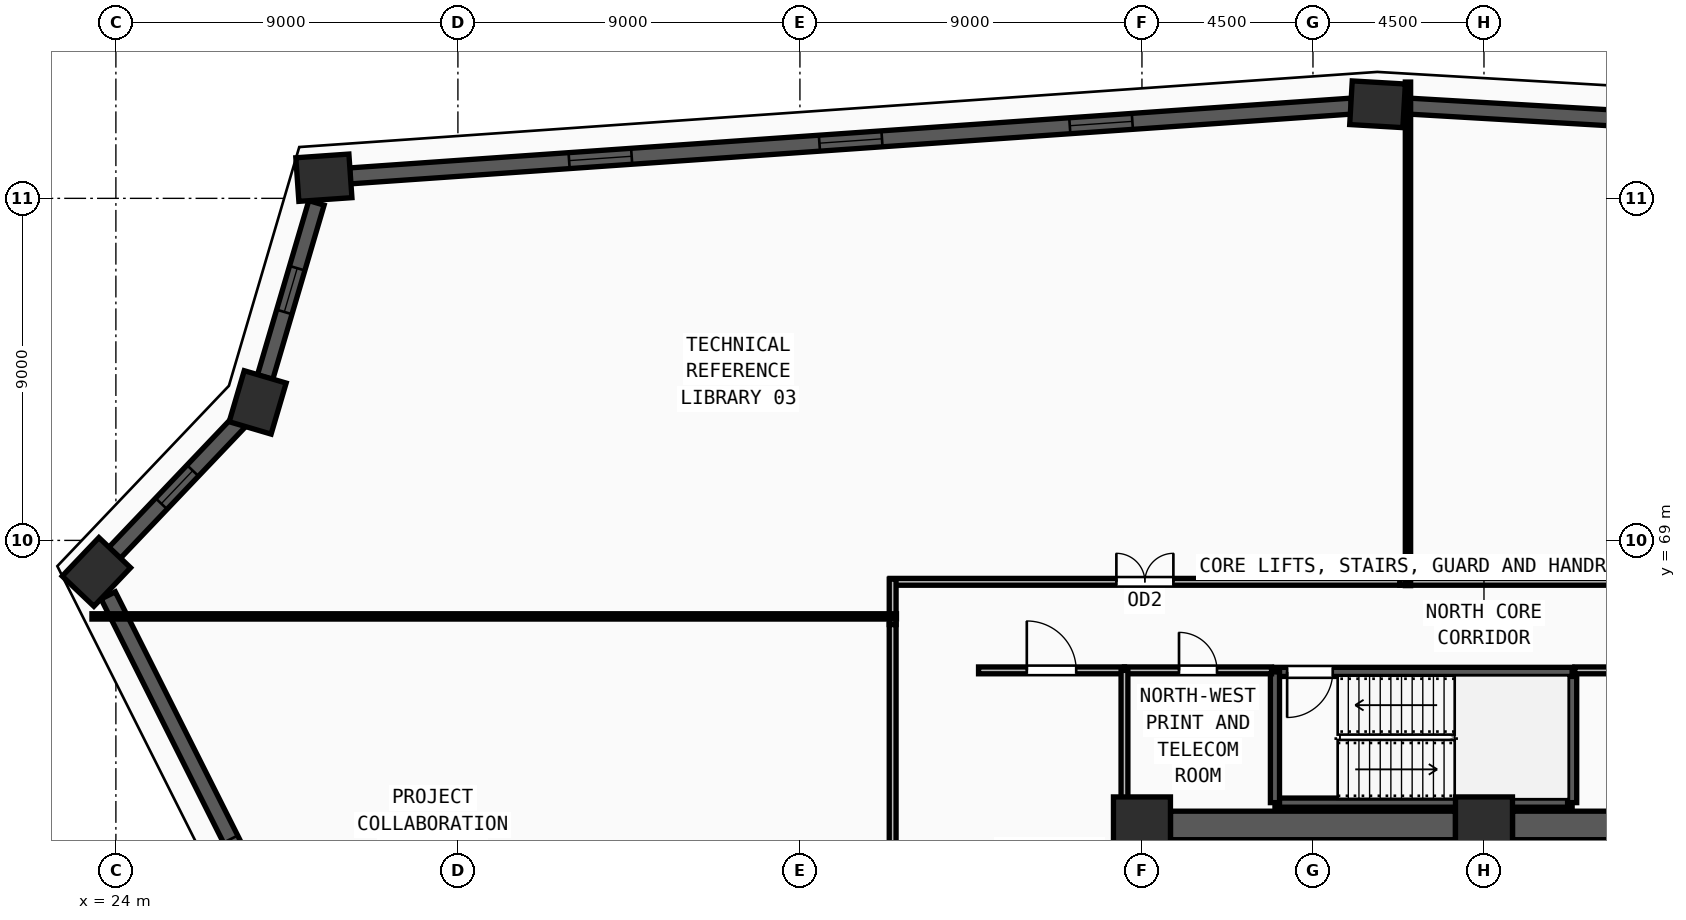
"""IFC4 building model, lengths in metres.
Left out: names, types, materials, properties, quantities, classifications, styles, units other than length and angle.
Written with IfcOpenShell. Run it as: python <this file> out.ifc"""

import sys

from ifc_helpers import new_model, si_unit, direction, frame, frame_2d, origin, origin_2d, place, context, subcontext, project, spatial, rectangle, extrude, source, transform, mapped, element, fill, save


model = new_model("IFC4")
c1 = context("Model", 3, precision=1e-05, world=origin(), true_north=direction((0.0, 1.0)))
c2 = subcontext(c1, "Body", "Model", "MODEL_VIEW")
j1 = project(units=[si_unit("LENGTHUNIT", "METRE"), si_unit("PLANEANGLEUNIT", "RADIAN")], contexts=[c1])
p1 = place(None, origin())
s1 = spatial("IfcSite", under=j1, at=p1, CompositionType="ELEMENT")
p2 = place(p1, origin())
s2 = spatial("IfcBuilding", under=s1, at=p2, CompositionType="ELEMENT")
p3 = place(p2, frame((0.0, 0.0, 113.25)))
s3 = spatial("IfcBuildingStorey", under=s2, at=p3, CompositionType="ELEMENT", Elevation=113.25)
m1 = source(origin(), c2, "Body", "SweptSolid", [
    extrude(rectangle(XDim=1.5, YDim=1.5, at=origin_2d()), origin(), (0.0, 0.0, 1.0), 3.75),
])
for number, where, z_axis, x_axis in (
    (1, (60.0, 61.5, 0.0), (0.0, 0.0, 1.0), (1.0, 0.0, 0.0)),
    (2, (51.0, 61.5, 0.0), (0.0, 0.0, 1.0), (1.0, 0.0, 0.0)),
):
    element("IfcColumn", number, at=place(p3, frame(where, z_axis=z_axis, x_axis=x_axis)), inside=s3, PredefinedType="COLUMN", context=c2, shape_type="MappedRepresentation", body=[
        mapped(m1, transform((0.0, 0.0, 0.0), x_axis=(1.0, 0.0, 0.0), y_axis=(0.0, 1.0, 0.0), z_axis=(0.0, 0.0, 1.0), scale=1.0)),
    ])
m2 = source(origin(), c2, "Body", "SweptSolid", [
    extrude(rectangle(XDim=1.4, YDim=1.15, at=origin_2d()), origin(), (0.0, 0.0, 1.0), 3.75),
])
for number, where, z_axis, x_axis in (
    (3, (23.487, 68.17, 0.0), (0.0, 0.0, 1.0), (0.689, 0.724, 0.0)),
    (4, (27.731, 72.631, 0.0), (0.0, 0.0, 1.0), (0.283, 0.959, 0.0)),
    (5, (29.473, 78.543, 0.0), (0.0, 0.0, 1.0), (0.998, 0.07, 0.0)),
    (6, (57.199, 80.475, 0.0), (0.0, 0.0, 1.0), (-0.998, 0.058, 0.0)),
):
    element("IfcColumn", number, at=place(p3, frame(where, z_axis=z_axis, x_axis=x_axis)), inside=s3, PredefinedType="COLUMN", context=c2, shape_type="MappedRepresentation", body=[
        mapped(m2, transform((0.0, 0.0, 0.0), x_axis=(1.0, 0.0, 0.0), y_axis=(0.0, 1.0, 0.0), z_axis=(0.0, 0.0, 1.0), scale=1.0)),
    ])
p4 = place(p3, frame((89.84, 78.576, 0.0), z_axis=(0.0, 0.0, 1.0), x_axis=(-0.99831154776, 0.05808660439, 0.0)))
e7 = element("IfcWall", 7, at=p4, inside=s3, PredefinedType="SOLIDWALL", context=c2, shape_type="SweptSolid", body=[
    extrude(rectangle(XDim=32.006, YDim=0.42, at=frame_2d((16.003, 0.0))), origin(), (0.0, 0.0, 1.0), 3.57),
])
m3 = source(origin(), c2, "Body", "SweptSolid", [
    extrude(rectangle(XDim=1.65, YDim=1.95, at=frame_2d((0.825, 0.975))), frame((0.0, 0.22, 0.0), z_axis=(0.0, -1.0, 0.0), x_axis=(1.0, 0.0, 0.0)), (0.0, 0.0, 1.0), 0.44),
])
p5 = place(p4, frame((7.177, 0.0, 0.55)))
e8 = element("IfcOpeningElement", 8, at=p5, cuts=e7, PredefinedType="OPENING", context=c2, shape_type="MappedRepresentation", body=[
    mapped(m3, transform((0.0, 0.0, 0.0), x_axis=(1.0, 0.0, 0.0), y_axis=(0.0, 1.0, 0.0), z_axis=(0.0, 0.0, 1.0), scale=1.0)),
])
p6 = place(p4, frame((15.178, 0.0, 0.55)))
e9 = element("IfcOpeningElement", 9, at=p6, cuts=e7, PredefinedType="OPENING", context=c2, shape_type="MappedRepresentation", body=[
    mapped(m3, transform((0.0, 0.0, 0.0), x_axis=(1.0, 0.0, 0.0), y_axis=(0.0, 1.0, 0.0), z_axis=(0.0, 0.0, 1.0), scale=1.0)),
])
p7 = place(p4, frame((23.18, 0.0, 0.55)))
e10 = element("IfcOpeningElement", 10, at=p7, cuts=e7, PredefinedType="OPENING", context=c2, shape_type="MappedRepresentation", body=[
    mapped(m3, transform((0.0, 0.0, 0.0), x_axis=(1.0, 0.0, 0.0), y_axis=(0.0, 1.0, 0.0), z_axis=(0.0, 0.0, 1.0), scale=1.0)),
])
p8 = place(p3, frame((56.511, 80.427, 0.0), z_axis=(0.0, 0.0, 1.0), x_axis=(-0.997581513864, -0.069506281704, 0.0)))
e11 = element("IfcWall", 11, at=p8, inside=s3, PredefinedType="SOLIDWALL", context=c2, shape_type="SweptSolid", body=[
    extrude(rectangle(XDim=26.414, YDim=0.42, at=frame_2d((13.207, 0.0))), origin(), (0.0, 0.0, 1.0), 3.57),
])
p9 = place(p8, frame((5.778, 0.0, 0.55)))
e12 = element("IfcOpeningElement", 12, at=p9, cuts=e11, PredefinedType="OPENING", context=c2, shape_type="MappedRepresentation", body=[
    mapped(m3, transform((0.0, 0.0, 0.0), x_axis=(1.0, 0.0, 0.0), y_axis=(0.0, 1.0, 0.0), z_axis=(0.0, 0.0, 1.0), scale=1.0)),
])
p10 = place(p8, frame((12.382, 0.0, 0.55)))
e13 = element("IfcOpeningElement", 13, at=p10, cuts=e11, PredefinedType="OPENING", context=c2, shape_type="MappedRepresentation", body=[
    mapped(m3, transform((0.0, 0.0, 0.0), x_axis=(1.0, 0.0, 0.0), y_axis=(0.0, 1.0, 0.0), z_axis=(0.0, 0.0, 1.0), scale=1.0)),
])
p11 = place(p8, frame((18.985, 0.0, 0.55)))
e14 = element("IfcOpeningElement", 14, at=p11, cuts=e11, PredefinedType="OPENING", context=c2, shape_type="MappedRepresentation", body=[
    mapped(m3, transform((0.0, 0.0, 0.0), x_axis=(1.0, 0.0, 0.0), y_axis=(0.0, 1.0, 0.0), z_axis=(0.0, 0.0, 1.0), scale=1.0)),
])
p12 = place(p3, frame((29.278, 77.881, 0.0), z_axis=(0.0, 0.0, 1.0), x_axis=(-0.282666457409, -0.959218261844, 0.0)))
e15 = element("IfcWall", 15, at=p12, inside=s3, PredefinedType="SOLIDWALL", context=c2, shape_type="SweptSolid", body=[
    extrude(rectangle(XDim=4.783, YDim=0.42, at=frame_2d((2.392, 0.0))), origin(), (0.0, 0.0, 1.0), 3.57),
])
m4 = source(origin(), c2, "Body", "SweptSolid", [
    extrude(rectangle(XDim=1.2, YDim=1.9, at=frame_2d((0.6, 0.95))), frame((0.0, 0.22, 0.0), z_axis=(0.0, -1.0, 0.0), x_axis=(1.0, 0.0, 0.0)), (0.0, 0.0, 1.0), 0.44),
])
p13 = place(p12, frame((1.792, 0.0, 0.55)))
e16 = element("IfcOpeningElement", 16, at=p13, cuts=e15, PredefinedType="OPENING", context=c2, shape_type="MappedRepresentation", body=[
    mapped(m4, transform((0.0, 0.0, 0.0), x_axis=(1.0, 0.0, 0.0), y_axis=(0.0, 1.0, 0.0), z_axis=(0.0, 0.0, 1.0), scale=1.0)),
])
p14 = place(p3, frame((27.255, 72.131, 0.0), z_axis=(0.0, 0.0, 1.0), x_axis=(-0.689175152742, -0.724594789412, 0.0)))
e17 = element("IfcWall", 17, at=p14, inside=s3, PredefinedType="SOLIDWALL", context=c2, shape_type="SweptSolid", body=[
    extrude(rectangle(XDim=4.777, YDim=0.42, at=frame_2d((2.388, 0.0))), origin(), (0.0, 0.0, 1.0), 3.57),
])
p15 = place(p14, frame((1.788, 0.0, 0.55)))
e18 = element("IfcOpeningElement", 18, at=p15, cuts=e17, PredefinedType="OPENING", context=c2, shape_type="MappedRepresentation", body=[
    mapped(m4, transform((0.0, 0.0, 0.0), x_axis=(1.0, 0.0, 0.0), y_axis=(0.0, 1.0, 0.0), z_axis=(0.0, 0.0, 1.0), scale=1.0)),
])
p16 = place(p3, frame((23.797, 67.553, 0.0), z_axis=(0.0, 0.0, 1.0), x_axis=(0.448851439989, -0.893606392558, 0.0)))
e19 = element("IfcWall", 19, at=p16, inside=s3, PredefinedType="SOLIDWALL", context=c2, shape_type="SweptSolid", body=[
    extrude(rectangle(XDim=32.004, YDim=0.42, at=frame_2d((16.002, 0.0))), origin(), (0.0, 0.0, 1.0), 3.57),
])
p17 = place(p16, frame((7.176, 0.0, 0.55)))
e20 = element("IfcOpeningElement", 20, at=p17, cuts=e19, PredefinedType="OPENING", context=c2, shape_type="MappedRepresentation", body=[
    mapped(m3, transform((0.0, 0.0, 0.0), x_axis=(1.0, 0.0, 0.0), y_axis=(0.0, 1.0, 0.0), z_axis=(0.0, 0.0, 1.0), scale=1.0)),
])
p18 = place(p16, frame((23.178, 0.0, 0.55)))
e21 = element("IfcOpeningElement", 21, at=p18, cuts=e19, PredefinedType="OPENING", context=c2, shape_type="MappedRepresentation", body=[
    mapped(m3, transform((0.0, 0.0, 0.0), x_axis=(1.0, 0.0, 0.0), y_axis=(0.0, 1.0, 0.0), z_axis=(0.0, 0.0, 1.0), scale=1.0)),
])
for number, where, z_axis, x_axis in (
    (22, (51.75, 61.5, 0.0), (0.0, 0.0, 1.0), (1.0, 0.0, 0.0)),
    (23, (60.75, 61.5, 0.0), (0.0, 0.0, 1.0), (1.0, 0.0, 0.0)),
):
    element("IfcWall", number, at=place(p3, frame(where, z_axis=z_axis, x_axis=x_axis)), inside=s3, PredefinedType="SHEAR", context=c2, shape_type="SweptSolid", body=[
        extrude(rectangle(XDim=7.5, YDim=0.75, at=frame_2d((3.75, 0.0))), origin(), (0.0, 0.0, 1.0), 3.57),
    ])
p19 = place(p3, frame((54.5, 62.1, 0.0), z_axis=(0.0, 0.0, 1.0), x_axis=(1.0, 0.0, 0.0)))
e24 = element("IfcWall", 24, at=p19, inside=s3, PredefinedType="SOLIDWALL", context=c2, shape_type="SweptSolid", body=[
    extrude(rectangle(XDim=7.82, YDim=0.24, at=frame_2d((3.91, 0.0))), origin(), (0.0, 0.0, 1.0), 3.57),
])
p20 = place(p3, frame((62.32, 62.1, 0.0), z_axis=(0.0, 0.0, 1.0), x_axis=(0.0, 1.0, 0.0)))
e25 = element("IfcWall", 25, at=p20, inside=s3, PredefinedType="SOLIDWALL", context=c2, shape_type="SweptSolid", body=[
    extrude(rectangle(XDim=3.44, YDim=0.24, at=frame_2d((1.72, 0.0))), origin(), (0.0, 0.0, 1.0), 3.57),
])
p21 = place(p3, frame((62.32, 65.54, 0.0), z_axis=(0.0, 0.0, 1.0), x_axis=(-1.0, 0.0, 0.0)))
e26 = element("IfcWall", 26, at=p21, inside=s3, PredefinedType="SOLIDWALL", context=c2, shape_type="SweptSolid", body=[
    extrude(rectangle(XDim=7.82, YDim=0.24, at=frame_2d((3.91, 0.0))), origin(), (0.0, 0.0, 1.0), 3.57),
])
m5 = source(origin(), c2, "Body", "SweptSolid", [
    extrude(rectangle(XDim=1.2, YDim=2.2, at=frame_2d((0.6, 1.1))), frame((0.0, 0.13, 0.0), z_axis=(0.0, -1.0, 0.0), x_axis=(1.0, 0.0, 0.0)), (0.0, 0.0, 1.0), 0.26),
])
p22 = place(p21, frame((6.3, 0.0, 0.0)))
e27 = element("IfcOpeningElement", 27, at=p22, cuts=e26, PredefinedType="OPENING", context=c2, shape_type="MappedRepresentation", body=[
    mapped(m5, transform((0.0, 0.0, 0.0), x_axis=(1.0, 0.0, 0.0), y_axis=(0.0, 1.0, 0.0), z_axis=(0.0, 0.0, 1.0), scale=1.0)),
])
p23 = place(p3, frame((54.5, 65.54, 0.0), z_axis=(0.0, 0.0, 1.0), x_axis=(0.0, -1.0, 0.0)))
e28 = element("IfcWall", 28, at=p23, inside=s3, PredefinedType="SOLIDWALL", context=c2, shape_type="SweptSolid", body=[
    extrude(rectangle(XDim=3.44, YDim=0.24, at=frame_2d((1.72, 0.0))), origin(), (0.0, 0.0, 1.0), 3.57),
])
p24 = place(p3, frame((50.54, 65.58, 0.0), z_axis=(0.0, 0.0, 1.0), x_axis=(1.0, 0.0, 0.0)))
e29 = element("IfcWall", 29, at=p24, inside=s3, PredefinedType="PARTITIONING", context=c2, shape_type="SweptSolid", body=[
    extrude(rectangle(XDim=3.87, YDim=0.18, at=frame_2d((1.935, 0.0))), origin(), (0.0, 0.0, 1.0), 3.57),
])
m6 = source(origin(), c2, "Body", "SweptSolid", [
    extrude(rectangle(XDim=1.0, YDim=2.2, at=frame_2d((0.5, 1.1))), frame((0.0, 0.1, 0.0), z_axis=(0.0, -1.0, 0.0), x_axis=(1.0, 0.0, 0.0)), (0.0, 0.0, 1.0), 0.2),
])
p25 = place(p24, frame((1.435, 0.0, 0.0)))
e30 = element("IfcOpeningElement", 30, at=p25, cuts=e29, PredefinedType="OPENING", context=c2, shape_type="MappedRepresentation", body=[
    mapped(m6, transform((0.0, 0.0, 0.0), x_axis=(1.0, 0.0, 0.0), y_axis=(0.0, 1.0, 0.0), z_axis=(0.0, 0.0, 1.0), scale=1.0)),
])
p26 = place(p3, frame((62.39, 65.58, 0.0), z_axis=(0.0, 0.0, 1.0), x_axis=(1.0, 0.0, 0.0)))
e31 = element("IfcWall", 31, at=p26, inside=s3, PredefinedType="PARTITIONING", context=c2, shape_type="SweptSolid", body=[
    extrude(rectangle(XDim=7.07, YDim=0.18, at=frame_2d((3.535, 0.0))), origin(), (0.0, 0.0, 1.0), 3.57),
])
p27 = place(p26, frame((3.035, 0.0, 0.0)))
e32 = element("IfcOpeningElement", 32, at=p27, cuts=e31, PredefinedType="OPENING", context=c2, shape_type="MappedRepresentation", body=[
    mapped(m6, transform((0.0, 0.0, 0.0), x_axis=(1.0, 0.0, 0.0), y_axis=(0.0, 1.0, 0.0), z_axis=(0.0, 0.0, 1.0), scale=1.0)),
])
p28 = place(p3, frame((46.7, 65.58, 0.0), z_axis=(0.0, 0.0, 1.0), x_axis=(1.0, 0.0, 0.0)))
e33 = element("IfcWall", 33, at=p28, inside=s3, PredefinedType="PARTITIONING", context=c2, shape_type="SweptSolid", body=[
    extrude(rectangle(XDim=3.84, YDim=0.18, at=frame_2d((1.92, 0.0))), origin(), (0.0, 0.0, 1.0), 3.57),
])
m7 = source(origin(), c2, "Body", "SweptSolid", [
    extrude(rectangle(XDim=1.3, YDim=2.2, at=frame_2d((0.65, 1.1))), frame((0.0, 0.1, 0.0), z_axis=(0.0, -1.0, 0.0), x_axis=(1.0, 0.0, 0.0)), (0.0, 0.0, 1.0), 0.2),
])
p29 = place(p28, frame((1.27, 0.0, 0.0)))
e34 = element("IfcOpeningElement", 34, at=p29, cuts=e33, PredefinedType="OPENING", context=c2, shape_type="MappedRepresentation", body=[
    mapped(m7, transform((0.0, 0.0, 0.0), x_axis=(1.0, 0.0, 0.0), y_axis=(0.0, 1.0, 0.0), z_axis=(0.0, 0.0, 1.0), scale=1.0)),
])
p30 = place(p3, frame((57.785, 67.91, 0.0), z_axis=(0.0, 0.0, 1.0), x_axis=(1.0, 0.0, 0.0)))
e35 = element("IfcWall", 35, at=p30, inside=s3, PredefinedType="PARTITIONING", context=c2, shape_type="SweptSolid", body=[
    extrude(rectangle(XDim=17.845, YDim=0.18, at=frame_2d((8.922, 0.0))), origin(), (0.0, 0.0, 1.0), 3.57),
])
m8 = source(origin(), c2, "Body", "SweptSolid", [
    extrude(rectangle(XDim=1.5, YDim=2.2, at=frame_2d((0.75, 1.1))), frame((0.0, 0.1, 0.0), z_axis=(0.0, -1.0, 0.0), x_axis=(1.0, 0.0, 0.0)), (0.0, 0.0, 1.0), 0.2),
])
p31 = place(p30, frame((8.172, 0.0, 0.0)))
e36 = element("IfcOpeningElement", 36, at=p31, cuts=e35, PredefinedType="OPENING", context=c2, shape_type="MappedRepresentation", body=[
    mapped(m8, transform((0.0, 0.0, 0.0), x_axis=(1.0, 0.0, 0.0), y_axis=(0.0, 1.0, 0.0), z_axis=(0.0, 0.0, 1.0), scale=1.0)),
])
p32 = place(p3, frame((44.37, 67.91, 0.0), z_axis=(0.0, 0.0, 1.0), x_axis=(1.0, 0.0, 0.0)))
e37 = element("IfcWall", 37, at=p32, inside=s3, PredefinedType="PARTITIONING", context=c2, shape_type="SweptSolid", body=[
    extrude(rectangle(XDim=13.415, YDim=0.18, at=frame_2d((6.708, 0.0))), origin(), (0.0, 0.0, 1.0), 3.57),
])
p33 = place(p32, frame((5.957, 0.0, 0.0)))
e38 = element("IfcOpeningElement", 38, at=p33, cuts=e37, PredefinedType="OPENING", context=c2, shape_type="MappedRepresentation", body=[
    mapped(m8, transform((0.0, 0.0, 0.0), x_axis=(1.0, 0.0, 0.0), y_axis=(0.0, 1.0, 0.0), z_axis=(0.0, 0.0, 1.0), scale=1.0)),
])
p34 = place(p3, frame((50.54, 61.95, 0.0), z_axis=(0.0, 0.0, 1.0), x_axis=(0.0, 1.0, 0.0)))
e39 = element("IfcWall", 39, at=p34, inside=s3, PredefinedType="PARTITIONING", context=c2, shape_type="SweptSolid", body=[
    extrude(rectangle(XDim=3.63, YDim=0.18, at=frame_2d((1.815, 0.0))), origin(), (0.0, 0.0, 1.0), 3.57),
])
p35 = place(p3, frame((44.44, 66.785, 0.0), z_axis=(0.0, 0.0, 1.0), x_axis=(0.0, 1.0, 0.0)))
e40 = element("IfcWall", 40, at=p35, inside=s3, PredefinedType="PARTITIONING", context=c2, shape_type="SweptSolid", body=[
    extrude(rectangle(XDim=1.195, YDim=0.18, at=frame_2d((0.598, 0.0))), origin(), (0.0, 0.0, 1.0), 3.57),
])
p36 = place(p3, frame((44.44, 56.19, 0.0), z_axis=(0.0, 0.0, 1.0), x_axis=(0.0, 1.0, 0.0)))
e41 = element("IfcWall", 41, at=p36, inside=s3, PredefinedType="PARTITIONING", context=c2, shape_type="SweptSolid", body=[
    extrude(rectangle(XDim=10.595, YDim=0.18, at=frame_2d((5.297, 0.0))), origin(), (0.0, 0.0, 1.0), 3.57),
])
p37 = place(p3, frame((44.54, 67.0, 0.0), z_axis=(0.0, 0.0, 1.0), x_axis=(-1.0, 0.0, 0.0)))
e42 = element("IfcWall", 42, at=p37, inside=s3, PredefinedType="PARTITIONING", context=c2, shape_type="SweptSolid", body=[
    extrude(rectangle(XDim=21.17, YDim=0.14, at=frame_2d((10.585, 0.0))), origin(), (0.0, 0.0, 1.0), 2.755),
])
p38 = place(p3, frame((58.0, 67.81, 0.0), z_axis=(0.0, 0.0, 1.0), x_axis=(0.0, 1.0, 0.0)))
e43 = element("IfcWall", 43, at=p38, inside=s3, PredefinedType="PARTITIONING", context=c2, shape_type="SweptSolid", body=[
    extrude(rectangle(XDim=13.25, YDim=0.14, at=frame_2d((6.625, 0.0))), origin(), (0.0, 0.0, 1.0), 3.57),
])
m9 = source(origin(), c2, "Body", "SweptSolid", [
    extrude(rectangle(XDim=1.65, YDim=1.95, at=frame_2d((0.825, 0.975))), frame((0.0, 0.03, 0.0), z_axis=(0.0, -1.0, 0.0), x_axis=(1.0, 0.0, 0.0)), (0.0, 0.0, 1.0), 0.06),
])
p39 = place(p9, origin())
e44 = element("IfcWindow", 44, at=p39, inside=s3, PartitioningType="DOUBLE_PANEL_VERTICAL", PredefinedType="WINDOW", context=c2, shape_type="MappedRepresentation", body=[
    mapped(m9, transform((0.0, 0.0, 0.0), x_axis=(1.0, 0.0, 0.0), y_axis=(0.0, 1.0, 0.0), z_axis=(0.0, 0.0, 1.0), scale=1.0)),
])
fill(e12, e44)
p40 = place(p10, origin())
e45 = element("IfcWindow", 45, at=p40, inside=s3, PartitioningType="DOUBLE_PANEL_VERTICAL", PredefinedType="WINDOW", context=c2, shape_type="MappedRepresentation", body=[
    mapped(m9, transform((0.0, 0.0, 0.0), x_axis=(1.0, 0.0, 0.0), y_axis=(0.0, 1.0, 0.0), z_axis=(0.0, 0.0, 1.0), scale=1.0)),
])
fill(e13, e45)
p41 = place(p11, origin())
e46 = element("IfcWindow", 46, at=p41, inside=s3, PartitioningType="DOUBLE_PANEL_VERTICAL", PredefinedType="WINDOW", context=c2, shape_type="MappedRepresentation", body=[
    mapped(m9, transform((0.0, 0.0, 0.0), x_axis=(1.0, 0.0, 0.0), y_axis=(0.0, 1.0, 0.0), z_axis=(0.0, 0.0, 1.0), scale=1.0)),
])
fill(e14, e46)
m10 = source(origin(), c2, "Body", "SweptSolid", [
    extrude(rectangle(XDim=1.2, YDim=1.9, at=frame_2d((0.6, 0.95))), frame((0.0, 0.03, 0.0), z_axis=(0.0, -1.0, 0.0), x_axis=(1.0, 0.0, 0.0)), (0.0, 0.0, 1.0), 0.06),
])
p42 = place(p13, origin())
e47 = element("IfcWindow", 47, at=p42, inside=s3, PartitioningType="SINGLE_PANEL", PredefinedType="WINDOW", context=c2, shape_type="MappedRepresentation", body=[
    mapped(m10, transform((0.0, 0.0, 0.0), x_axis=(1.0, 0.0, 0.0), y_axis=(0.0, 1.0, 0.0), z_axis=(0.0, 0.0, 1.0), scale=1.0)),
])
fill(e16, e47)
p43 = place(p15, origin())
e48 = element("IfcWindow", 48, at=p43, inside=s3, PartitioningType="SINGLE_PANEL", PredefinedType="WINDOW", context=c2, shape_type="MappedRepresentation", body=[
    mapped(m10, transform((0.0, 0.0, 0.0), x_axis=(1.0, 0.0, 0.0), y_axis=(0.0, 1.0, 0.0), z_axis=(0.0, 0.0, 1.0), scale=1.0)),
])
fill(e18, e48)
p44 = place(p17, origin())
e49 = element("IfcWindow", 49, at=p44, inside=s3, PartitioningType="DOUBLE_PANEL_VERTICAL", PredefinedType="WINDOW", context=c2, shape_type="MappedRepresentation", body=[
    mapped(m9, transform((0.0, 0.0, 0.0), x_axis=(1.0, 0.0, 0.0), y_axis=(0.0, 1.0, 0.0), z_axis=(0.0, 0.0, 1.0), scale=1.0)),
])
fill(e20, e49)
m11 = source(origin(), c2, "Body", "SweptSolid", [
    extrude(rectangle(XDim=1.2, YDim=2.2, at=frame_2d((0.6, 1.1))), frame((0.0, 0.025, 0.0), z_axis=(0.0, -1.0, 0.0), x_axis=(1.0, 0.0, 0.0)), (0.0, 0.0, 1.0), 0.05),
])
p45 = place(p22, origin())
e50 = element("IfcDoor", 50, at=p45, inside=s3, OperationType="SINGLE_SWING_RIGHT", PredefinedType="DOOR", context=c2, shape_type="MappedRepresentation", body=[
    mapped(m11, transform((0.0, 0.0, 0.0), x_axis=(1.0, 0.0, 0.0), y_axis=(0.0, 1.0, 0.0), z_axis=(0.0, 0.0, 1.0), scale=1.0)),
])
fill(e27, e50)
m12 = source(origin(), c2, "Body", "SweptSolid", [
    extrude(rectangle(XDim=1.0, YDim=2.2, at=frame_2d((0.5, 1.1))), frame((0.0, 0.025, 0.0), z_axis=(0.0, -1.0, 0.0), x_axis=(1.0, 0.0, 0.0)), (0.0, 0.0, 1.0), 0.05),
])
p46 = place(p25, origin())
e51 = element("IfcDoor", 51, at=p46, inside=s3, OperationType="SINGLE_SWING_LEFT", PredefinedType="DOOR", context=c2, shape_type="MappedRepresentation", body=[
    mapped(m12, transform((0.0, 0.0, 0.0), x_axis=(1.0, 0.0, 0.0), y_axis=(0.0, 1.0, 0.0), z_axis=(0.0, 0.0, 1.0), scale=1.0)),
])
fill(e30, e51)
m13 = source(origin(), c2, "Body", "SweptSolid", [
    extrude(rectangle(XDim=1.3, YDim=2.2, at=frame_2d((0.65, 1.1))), frame((0.0, 0.025, 0.0), z_axis=(0.0, -1.0, 0.0), x_axis=(1.0, 0.0, 0.0)), (0.0, 0.0, 1.0), 0.05),
])
p47 = place(p29, origin())
e52 = element("IfcDoor", 52, at=p47, inside=s3, OperationType="SINGLE_SWING_LEFT", PredefinedType="DOOR", context=c2, shape_type="MappedRepresentation", body=[
    mapped(m13, transform((0.0, 0.0, 0.0), x_axis=(1.0, 0.0, 0.0), y_axis=(0.0, 1.0, 0.0), z_axis=(0.0, 0.0, 1.0), scale=1.0)),
])
fill(e34, e52)
m14 = source(origin(), c2, "Body", "SweptSolid", [
    extrude(rectangle(XDim=1.5, YDim=2.2, at=frame_2d((0.75, 1.1))), frame((0.0, 0.025, 0.0), z_axis=(0.0, -1.0, 0.0), x_axis=(1.0, 0.0, 0.0)), (0.0, 0.0, 1.0), 0.05),
])
p48 = place(p33, origin())
e53 = element("IfcDoor", 53, at=p48, inside=s3, OperationType="DOUBLE_DOOR_SINGLE_SWING", PredefinedType="DOOR", context=c2, shape_type="MappedRepresentation", body=[
    mapped(m14, transform((0.0, 0.0, 0.0), x_axis=(1.0, 0.0, 0.0), y_axis=(0.0, 1.0, 0.0), z_axis=(0.0, 0.0, 1.0), scale=1.0)),
])
fill(e38, e53)
save(model, sys.argv[1])
